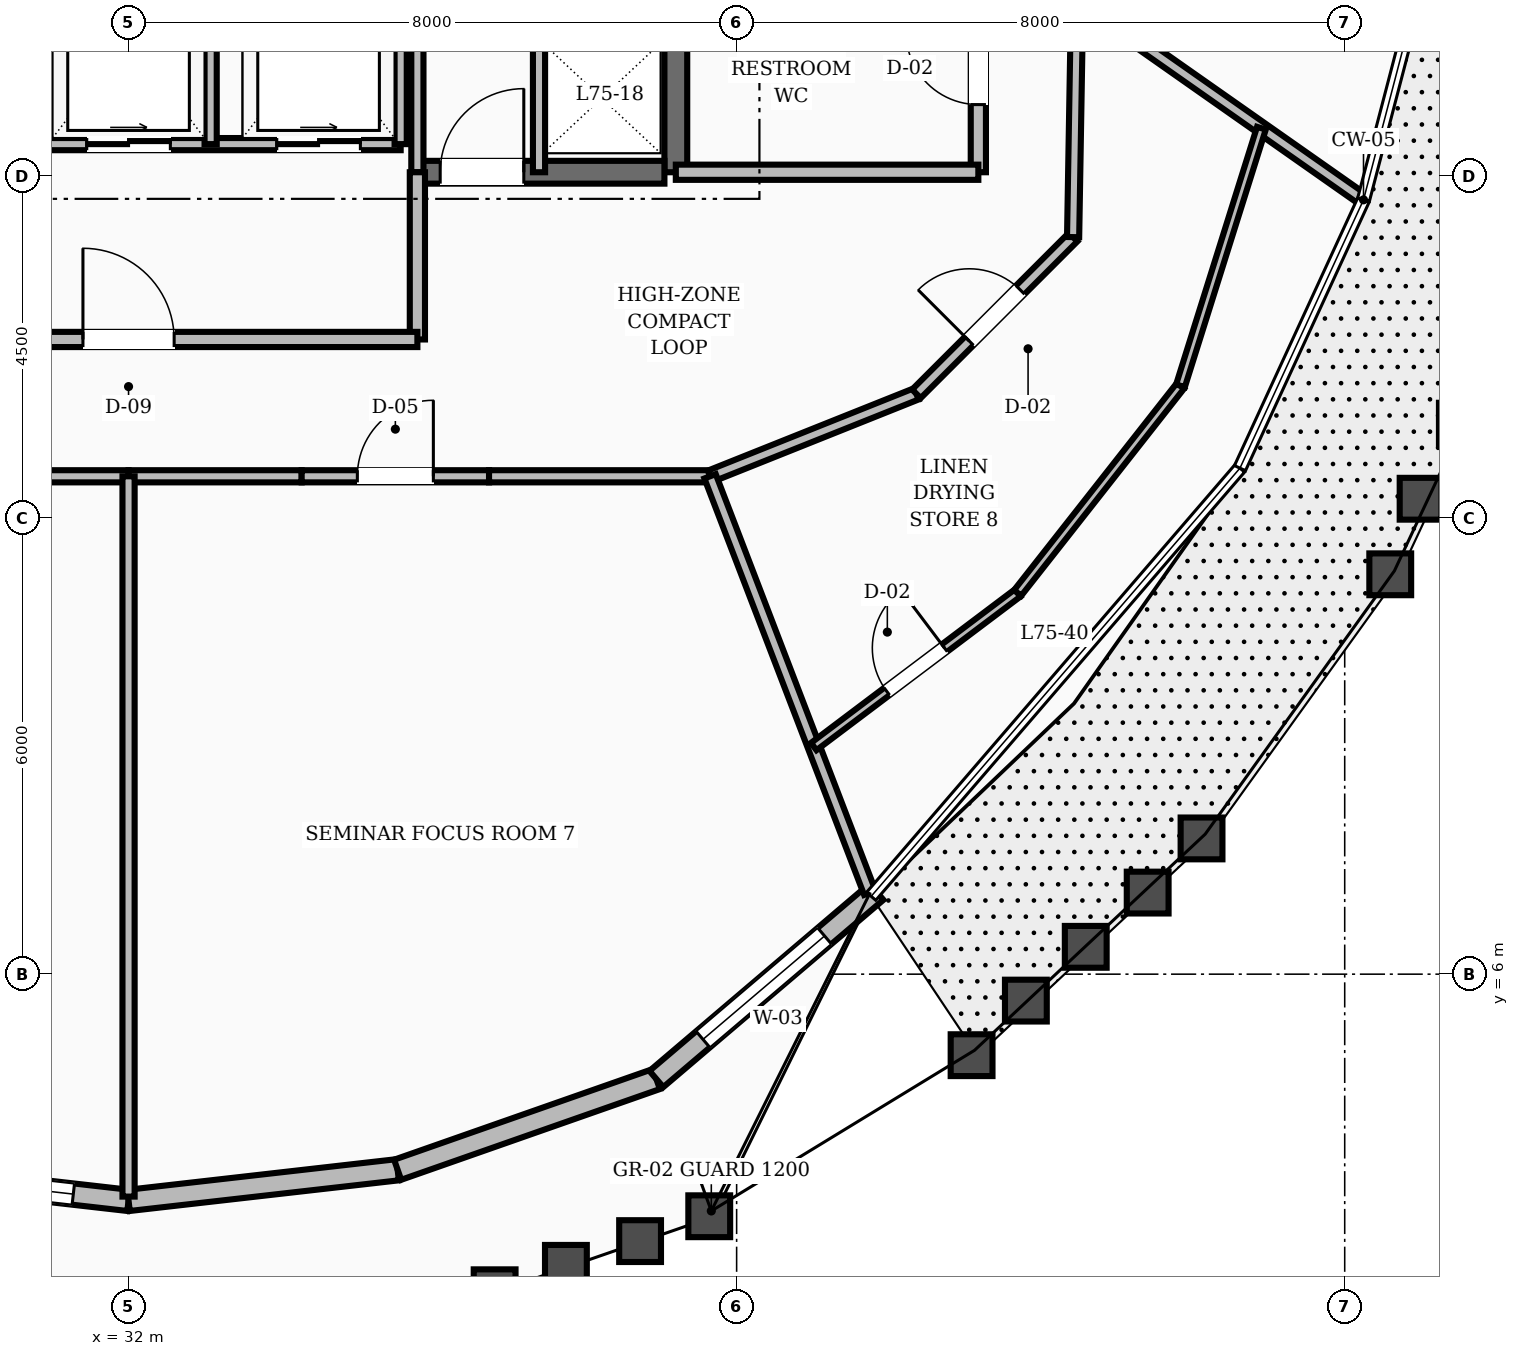
"""IFC4 building model, lengths in metres.
Left out: names, types, materials, properties, quantities, classifications, styles, units other than length and angle.
Written with IfcOpenShell. Run it as: python <this file> out.ifc"""

import sys

from ifc_helpers import new_model, si_unit, direction, frame, frame_2d, origin, place, context, subcontext, project, spatial, rectangle, extrude, element, fill, save


model = new_model("IFC4")
c1 = context("Model", 3, precision=1e-05, world=origin(), true_north=direction((0.0, 1.0)))
c2 = subcontext(c1, "Body", "Model", "MODEL_VIEW")
j1 = project(units=[si_unit("LENGTHUNIT", "METRE"), si_unit("PLANEANGLEUNIT", "RADIAN")], contexts=[c1])
p1 = place(None, origin())
s1 = spatial("IfcSite", under=j1, at=p1, CompositionType="ELEMENT")
p2 = place(p1, origin())
s2 = spatial("IfcBuilding", under=s1, at=p2, CompositionType="ELEMENT")
p3 = place(p2, frame((0.0, 0.0, 286.8)))
s3 = spatial("IfcBuildingStorey", under=s2, at=p3, CompositionType="ELEMENT", Elevation=286.8)
p4 = place(p3, frame((39.2, 16.55, 0.0), z_axis=(0.0, 0.0, 1.0), x_axis=(0.0, 1.0, 0.0)))
e1 = element("IfcWall", 1, at=p4, inside=s3, PredefinedType="SHEAR", context=c2, shape_type="SweptSolid", body=[
    extrude(rectangle(XDim=6.3, YDim=0.3, at=frame_2d((3.15, 0.0))), origin(), (0.0, 0.0, 1.0), 3.6),
])
p5 = place(p3, frame((35.8, 16.55, 0.0), z_axis=(0.0, 0.0, 1.0), x_axis=(1.0, 0.0, 0.0)))
e2 = element("IfcWall", 2, at=p5, inside=s3, PredefinedType="SHEAR", context=c2, shape_type="SweptSolid", body=[
    extrude(rectangle(XDim=3.25, YDim=0.3, at=frame_2d((1.625, 0.0))), origin(), (0.0, 0.0, 1.0), 3.6),
])
p6 = place(p5, frame((0.3, 0.0, 0.0)))
e3 = element("IfcOpeningElement", 3, at=p6, cuts=e2, PredefinedType="OPENING", context=c2, shape_type="SweptSolid", body=[
    extrude(rectangle(XDim=1.1, YDim=2.1, at=frame_2d((0.55, 1.05))), frame((0.0, 0.16, 0.0), z_axis=(0.0, -1.0, 0.0), x_axis=(1.0, 0.0, 0.0)), (0.0, 0.0, 1.0), 0.32),
])
p7 = place(p3, frame((28.46, 3.427, 0.0), z_axis=(0.0, 0.0, 1.0), x_axis=(0.993580071332, -0.113131082605, 0.0)))
e4 = element("IfcWall", 4, at=p7, inside=s3, PredefinedType="STANDARD", context=c2, shape_type="SweptSolid", body=[
    extrude(rectangle(XDim=3.563, YDim=0.28, at=frame_2d((1.781, 0.0))), origin(), (0.0, 0.0, 1.0), 2.88),
])
p8 = place(p7, frame((0.731, 0.0, 0.8)))
e5 = element("IfcOpeningElement", 5, at=p8, cuts=e4, PredefinedType="OPENING", context=c2, shape_type="SweptSolid", body=[
    extrude(rectangle(XDim=2.1, YDim=1.65, at=frame_2d((1.05, 0.825))), frame((0.0, 0.15, 0.0), z_axis=(0.0, -1.0, 0.0), x_axis=(1.0, 0.0, 0.0)), (0.0, 0.0, 1.0), 0.3),
])
p9 = place(p3, frame((32.0, 3.024, 0.0), z_axis=(0.0, 0.0, 1.0), x_axis=(0.993580071332, 0.113131082605, 0.0)))
e6 = element("IfcWall", 6, at=p9, inside=s3, PredefinedType="STANDARD", context=c2, shape_type="SweptSolid", body=[
    extrude(rectangle(XDim=3.563, YDim=0.28, at=frame_2d((1.781, 0.0))), origin(), (0.0, 0.0, 1.0), 2.88),
])
p10 = place(p3, frame((35.54, 3.427, 0.0), z_axis=(0.0, 0.0, 1.0), x_axis=(0.94366932977, 0.33089000597, 0.0)))
e7 = element("IfcWall", 7, at=p10, inside=s3, PredefinedType="STANDARD", context=c2, shape_type="SweptSolid", body=[
    extrude(rectangle(XDim=3.607, YDim=0.28, at=frame_2d((1.804, 0.0))), origin(), (0.0, 0.0, 1.0), 2.88),
])
p11 = place(p3, frame((38.944, 4.62, 0.0), z_axis=(0.0, 0.0, 1.0), x_axis=(0.7617032154, 0.64792608502, 0.0)))
e8 = element("IfcWall", 8, at=p11, inside=s3, PredefinedType="STANDARD", context=c2, shape_type="SweptSolid", body=[
    extrude(rectangle(XDim=3.802, YDim=0.28, at=frame_2d((1.901, 0.0))), origin(), (0.0, 0.0, 1.0), 2.88),
])
p12 = place(p11, frame((0.805, 0.0, 0.8)))
e9 = element("IfcOpeningElement", 9, at=p12, cuts=e8, PredefinedType="OPENING", context=c2, shape_type="SweptSolid", body=[
    extrude(rectangle(XDim=2.1, YDim=1.65, at=frame_2d((1.05, 0.825))), frame((0.0, 0.15, 0.0), z_axis=(0.0, -1.0, 0.0), x_axis=(1.0, 0.0, 0.0)), (0.0, 0.0, 1.0), 0.3),
])
p13 = place(p3, frame((43.18, 16.55, 0.0), z_axis=(0.0, 0.0, 1.0), x_axis=(0.0, 1.0, 0.0)))
e10 = element("IfcWall", 10, at=p13, inside=s3, PredefinedType="SOLIDWALL", context=c2, shape_type="SweptSolid", body=[
    extrude(rectangle(XDim=2.73, YDim=0.2, at=frame_2d((1.365, 0.0))), origin(), (0.0, 0.0, 1.0), 2.87),
])
p14 = place(p13, frame((0.89, 0.0, 0.0)))
e11 = element("IfcOpeningElement", 11, at=p14, cuts=e10, PredefinedType="OPENING", context=c2, shape_type="SweptSolid", body=[
    extrude(rectangle(XDim=0.95, YDim=2.1, at=frame_2d((0.475, 1.05))), frame((0.0, 0.11, 0.0), z_axis=(0.0, -1.0, 0.0), x_axis=(1.0, 0.0, 0.0)), (0.0, 0.0, 1.0), 0.22),
])
p15 = place(p3, frame((39.2, 16.55, 0.0), z_axis=(0.0, 0.0, 1.0), x_axis=(1.0, 0.0, 0.0)))
e12 = element("IfcWall", 12, at=p15, inside=s3, PredefinedType="SOLIDWALL", context=c2, shape_type="SweptSolid", body=[
    extrude(rectangle(XDim=3.98, YDim=0.2, at=frame_2d((1.99, 0.0))), origin(), (0.0, 0.0, 1.0), 2.87),
])
p16 = place(p3, frame((35.8, 16.55, 0.0), z_axis=(0.0, 0.0, 1.0), x_axis=(0.0, 1.0, 0.0)))
e13 = element("IfcWall", 13, at=p16, inside=s3, PredefinedType="SOLIDWALL", context=c2, shape_type="SweptSolid", body=[
    extrude(rectangle(XDim=3.3, YDim=0.16, at=frame_2d((1.65, 0.0))), origin(), (0.0, 0.0, 1.0), 2.87),
])
p17 = place(p3, frame((37.4, 16.55, 0.0), z_axis=(0.0, 0.0, 1.0), x_axis=(0.0, 1.0, 0.0)))
e14 = element("IfcWall", 14, at=p17, inside=s3, PredefinedType="SOLIDWALL", context=c2, shape_type="SweptSolid", body=[
    extrude(rectangle(XDim=1.75, YDim=0.16, at=frame_2d((0.875, 0.0))), origin(), (0.0, 0.0, 1.0), 2.87),
])
p18 = place(p3, frame((35.8, 14.35, 0.0), z_axis=(0.0, 0.0, 1.0), x_axis=(0.0, 1.0, 0.0)))
e15 = element("IfcWall", 15, at=p18, inside=s3, PredefinedType="SOLIDWALL", context=c2, shape_type="SweptSolid", body=[
    extrude(rectangle(XDim=2.2, YDim=0.2, at=frame_2d((1.1, 0.0))), origin(), (0.0, 0.0, 1.0), 2.87),
])
p19 = place(p3, frame((28.2, 14.35, 0.0), z_axis=(0.0, 0.0, 1.0), x_axis=(1.0, 0.0, 0.0)))
e16 = element("IfcWall", 16, at=p19, inside=s3, PredefinedType="SOLIDWALL", context=c2, shape_type="SweptSolid", body=[
    extrude(rectangle(XDim=7.6, YDim=0.2, at=frame_2d((3.8, 0.0))), origin(), (0.0, 0.0, 1.0), 2.87),
])
p20 = place(p19, frame((3.2, 0.0, 0.0)))
e17 = element("IfcOpeningElement", 17, at=p20, cuts=e16, PredefinedType="OPENING", context=c2, shape_type="SweptSolid", body=[
    extrude(rectangle(XDim=1.2, YDim=2.1, at=frame_2d((0.6, 1.05))), frame((0.0, 0.11, 0.0), z_axis=(0.0, -1.0, 0.0), x_axis=(1.0, 0.0, 0.0)), (0.0, 0.0, 1.0), 0.22),
])
p21 = place(p3, frame((28.42, 16.92, 0.0), z_axis=(0.0, 0.0, 1.0), x_axis=(1.0, 0.0, 0.0)))
e18 = element("IfcWall", 18, at=p21, inside=s3, PredefinedType="SOLIDWALL", context=c2, shape_type="SweptSolid", body=[
    extrude(rectangle(XDim=7.16, YDim=0.16, at=frame_2d((3.58, 0.0))), origin(), (0.0, 0.0, 1.0), 2.87),
])
p22 = place(p21, frame((0.53, 0.0, 0.0)))
e19 = element("IfcOpeningElement", 19, at=p22, cuts=e18, PredefinedType="OPENING", context=c2, shape_type="SweptSolid", body=[
    extrude(rectangle(XDim=1.1, YDim=2.15, at=frame_2d((0.55, 1.075))), frame((0.0, 0.09, 0.0), z_axis=(0.0, -1.0, 0.0), x_axis=(1.0, 0.0, 0.0)), (0.0, 0.0, 1.0), 0.18),
])
p23 = place(p21, frame((3.03, 0.0, 0.0)))
e20 = element("IfcOpeningElement", 20, at=p23, cuts=e18, PredefinedType="OPENING", context=c2, shape_type="SweptSolid", body=[
    extrude(rectangle(XDim=1.1, YDim=2.15, at=frame_2d((0.55, 1.075))), frame((0.0, 0.09, 0.0), z_axis=(0.0, -1.0, 0.0), x_axis=(1.0, 0.0, 0.0)), (0.0, 0.0, 1.0), 0.18),
])
p24 = place(p21, frame((5.53, 0.0, 0.0)))
e21 = element("IfcOpeningElement", 21, at=p24, cuts=e18, PredefinedType="OPENING", context=c2, shape_type="SweptSolid", body=[
    extrude(rectangle(XDim=1.1, YDim=2.15, at=frame_2d((0.55, 1.075))), frame((0.0, 0.09, 0.0), z_axis=(0.0, -1.0, 0.0), x_axis=(1.0, 0.0, 0.0)), (0.0, 0.0, 1.0), 0.18),
])
for number, where, z_axis, x_axis in (
    (22, (33.08, 16.92, 0.0), (0.0, 0.0, 1.0), (0.0, 1.0, 0.0)),
    (23, (35.58, 16.92, 0.0), (0.0, 0.0, 1.0), (0.0, 1.0, 0.0)),
):
    element("IfcWall", number, at=place(p3, frame(where, z_axis=z_axis, x_axis=x_axis)), inside=s3, PredefinedType="SOLIDWALL", context=c2, shape_type="SweptSolid", body=[
        extrude(rectangle(XDim=2.76, YDim=0.16, at=frame_2d((1.38, 0.0))), origin(), (0.0, 0.0, 1.0), 2.87),
    ])
for number, where, z_axis, x_axis in (
    (24, (29.722, 12.55, 0.0), (0.0, 0.0, 1.0), (1.0, 0.0, 0.0)),
    (25, (32.0, 12.55, 0.0), (0.0, 0.0, 1.0), (1.0, 0.0, 0.0)),
):
    element("IfcWall", number, at=place(p3, frame(where, z_axis=z_axis, x_axis=x_axis)), inside=s3, PredefinedType="SOLIDWALL", context=c2, shape_type="SweptSolid", body=[
        extrude(rectangle(XDim=2.278, YDim=0.16, at=frame_2d((1.139, 0.0))), origin(), (0.0, 0.0, 1.0), 2.87),
    ])
p25 = place(p3, frame((34.278, 12.55, 0.0), z_axis=(0.0, 0.0, 1.0), x_axis=(1.0, 0.0, 0.0)))
e26 = element("IfcWall", 26, at=p25, inside=s3, PredefinedType="SOLIDWALL", context=c2, shape_type="SweptSolid", body=[
    extrude(rectangle(XDim=2.465, YDim=0.16, at=frame_2d((1.232, 0.0))), origin(), (0.0, 0.0, 1.0), 2.87),
])
p26 = place(p25, frame((0.733, 0.0, 0.0)))
e27 = element("IfcOpeningElement", 27, at=p26, cuts=e26, PredefinedType="OPENING", context=c2, shape_type="SweptSolid", body=[
    extrude(rectangle(XDim=1.0, YDim=2.1, at=frame_2d((0.5, 1.05))), frame((0.0, 0.09, 0.0), z_axis=(0.0, -1.0, 0.0), x_axis=(1.0, 0.0, 0.0)), (0.0, 0.0, 1.0), 0.18),
])
p27 = place(p3, frame((36.743, 12.55, 0.0), z_axis=(0.0, 0.0, 1.0), x_axis=(1.0, 0.0, 0.0)))
e28 = element("IfcWall", 28, at=p27, inside=s3, PredefinedType="SOLIDWALL", context=c2, shape_type="SweptSolid", body=[
    extrude(rectangle(XDim=2.908, YDim=0.16, at=frame_2d((1.454, 0.0))), origin(), (0.0, 0.0, 1.0), 2.87),
])
p28 = place(p3, frame((39.651, 12.55, 0.0), z_axis=(0.0, 0.0, 1.0), x_axis=(0.92856882165, 0.371160266542, 0.0)))
e29 = element("IfcWall", 29, at=p28, inside=s3, PredefinedType="SOLIDWALL", context=c2, shape_type="SweptSolid", body=[
    extrude(rectangle(XDim=2.923, YDim=0.16, at=frame_2d((1.461, 0.0))), origin(), (0.0, 0.0, 1.0), 2.87),
])
p29 = place(p3, frame((42.365, 13.635, 0.0), z_axis=(0.0, 0.0, 1.0), x_axis=(0.707106781187, 0.707106781187, 0.0)))
e30 = element("IfcWall", 30, at=p29, inside=s3, PredefinedType="SOLIDWALL", context=c2, shape_type="SweptSolid", body=[
    extrude(rectangle(XDim=2.916, YDim=0.16, at=frame_2d((1.458, 0.0))), origin(), (0.0, 0.0, 1.0), 2.87),
])
p30 = place(p29, frame((0.983, 0.0, 0.0)))
e31 = element("IfcOpeningElement", 31, at=p30, cuts=e30, PredefinedType="OPENING", context=c2, shape_type="SweptSolid", body=[
    extrude(rectangle(XDim=0.95, YDim=2.1, at=frame_2d((0.475, 1.05))), frame((0.0, 0.09, 0.0), z_axis=(0.0, -1.0, 0.0), x_axis=(1.0, 0.0, 0.0)), (0.0, 0.0, 1.0), 0.18),
])
p31 = place(p3, frame((44.427, 15.697, 0.0), z_axis=(0.0, 0.0, 1.0), x_axis=(0.016981035134, 0.999855811828, 0.0)))
e32 = element("IfcWall", 32, at=p31, inside=s3, PredefinedType="SOLIDWALL", context=c2, shape_type="SweptSolid", body=[
    extrude(rectangle(XDim=3.134, YDim=0.16, at=frame_2d((1.567, 0.0))), origin(), (0.0, 0.0, 1.0), 2.87),
])
p32 = place(p3, frame((44.48, 18.831, 0.0), z_axis=(0.0, 0.0, 1.0), x_axis=(0.818578812532, -0.574394226706, 0.0)))
e33 = element("IfcWall", 33, at=p32, inside=s3, PredefinedType="SOLIDWALL", context=c2, shape_type="SweptSolid", body=[
    extrude(rectangle(XDim=4.552, YDim=0.16, at=frame_2d((2.276, 0.0))), origin(), (0.0, 0.0, 1.0), 2.87),
])
p33 = place(p3, frame((32.0, 12.55, 0.0), z_axis=(0.0, 0.0, 1.0), x_axis=(0.0, -1.0, 0.0)))
e34 = element("IfcWall", 34, at=p33, inside=s3, PredefinedType="SOLIDWALL", context=c2, shape_type="SweptSolid", body=[
    extrude(rectangle(XDim=9.477, YDim=0.16, at=frame_2d((4.738, 0.0))), origin(), (0.0, 0.0, 1.0), 2.87),
])
p34 = place(p3, frame((39.651, 12.55, 0.0), z_axis=(0.0, 0.0, 1.0), x_axis=(0.35812583623, -0.933673329074, 0.0)))
e35 = element("IfcWall", 35, at=p34, inside=s3, PredefinedType="SOLIDWALL", context=c2, shape_type="SweptSolid", body=[
    extrude(rectangle(XDim=5.868, YDim=0.16, at=frame_2d((2.934, 0.0))), origin(), (0.0, 0.0, 1.0), 2.87),
])
p35 = place(p3, frame((41.014, 8.994, 0.0), z_axis=(0.0, 0.0, 1.0), x_axis=(0.798742125261, 0.601673513904, 0.0)))
e36 = element("IfcWall", 36, at=p35, inside=s3, PredefinedType="PARTITIONING", context=c2, shape_type="SweptSolid", body=[
    extrude(rectangle(XDim=3.359, YDim=0.12, at=frame_2d((1.679, 0.0))), origin(), (0.0, 0.0, 1.0), 2.87),
])
p36 = place(p35, frame((1.204, 0.0, 0.0)))
e37 = element("IfcOpeningElement", 37, at=p36, cuts=e36, PredefinedType="OPENING", context=c2, shape_type="SweptSolid", body=[
    extrude(rectangle(XDim=0.95, YDim=2.1, at=frame_2d((0.475, 1.05))), frame((0.0, 0.07, 0.0), z_axis=(0.0, -1.0, 0.0), x_axis=(1.0, 0.0, 0.0)), (0.0, 0.0, 1.0), 0.14),
])
p37 = place(p3, frame((43.697, 11.015, 0.0), z_axis=(0.0, 0.0, 1.0), x_axis=(0.617930396217, 0.786232806127, 0.0)))
e38 = element("IfcWall", 38, at=p37, inside=s3, PredefinedType="PARTITIONING", context=c2, shape_type="SweptSolid", body=[
    extrude(rectangle(XDim=3.467, YDim=0.12, at=frame_2d((1.733, 0.0))), origin(), (0.0, 0.0, 1.0), 2.87),
])
p38 = place(p3, frame((45.839, 13.741, 0.0), z_axis=(0.0, 0.0, 1.0), x_axis=(0.299765824915, 0.954012814491, 0.0)))
e39 = element("IfcWall", 39, at=p38, inside=s3, PredefinedType="PARTITIONING", context=c2, shape_type="SweptSolid", body=[
    extrude(rectangle(XDim=3.552, YDim=0.12, at=frame_2d((1.776, 0.0))), origin(), (0.0, 0.0, 1.0), 2.87),
])
p39 = place(p8, origin())
e40 = element("IfcWindow", 40, at=p39, inside=s3, PartitioningType="SINGLE_PANEL", PredefinedType="WINDOW", context=c2, shape_type="SweptSolid", body=[
    extrude(rectangle(XDim=2.1, YDim=1.65, at=frame_2d((1.05, 0.825))), frame((0.0, 0.03, 0.0), z_axis=(0.0, -1.0, 0.0), x_axis=(1.0, 0.0, 0.0)), (0.0, 0.0, 1.0), 0.06),
])
fill(e5, e40)
p40 = place(p12, origin())
e41 = element("IfcWindow", 41, at=p40, inside=s3, PartitioningType="SINGLE_PANEL", PredefinedType="WINDOW", context=c2, shape_type="SweptSolid", body=[
    extrude(rectangle(XDim=2.1, YDim=1.65, at=frame_2d((1.05, 0.825))), frame((0.0, 0.03, 0.0), z_axis=(0.0, -1.0, 0.0), x_axis=(1.0, 0.0, 0.0)), (0.0, 0.0, 1.0), 0.06),
])
fill(e9, e41)
p41 = place(p14, origin())
e42 = element("IfcDoor", 42, at=p41, inside=s3, OperationType="SINGLE_SWING_RIGHT", PredefinedType="DOOR", context=c2, shape_type="SweptSolid", body=[
    extrude(rectangle(XDim=0.95, YDim=2.1, at=frame_2d((0.475, 1.05))), frame((0.0, 0.025, 0.0), z_axis=(0.0, -1.0, 0.0), x_axis=(1.0, 0.0, 0.0)), (0.0, 0.0, 1.0), 0.05),
])
fill(e11, e42)
p42 = place(p6, origin())
e43 = element("IfcDoor", 43, at=p42, inside=s3, OperationType="SINGLE_SWING_RIGHT", PredefinedType="DOOR", context=c2, shape_type="SweptSolid", body=[
    extrude(rectangle(XDim=1.1, YDim=2.1, at=frame_2d((0.55, 1.05))), frame((0.0, 0.025, 0.0), z_axis=(0.0, -1.0, 0.0), x_axis=(1.0, 0.0, 0.0)), (0.0, 0.0, 1.0), 0.05),
])
fill(e3, e43)
p43 = place(p20, origin())
e44 = element("IfcDoor", 44, at=p43, inside=s3, OperationType="SINGLE_SWING_LEFT", PredefinedType="DOOR", context=c2, shape_type="SweptSolid", body=[
    extrude(rectangle(XDim=1.2, YDim=2.1, at=frame_2d((0.6, 1.05))), frame((0.0, 0.025, 0.0), z_axis=(0.0, -1.0, 0.0), x_axis=(1.0, 0.0, 0.0)), (0.0, 0.0, 1.0), 0.05),
])
fill(e17, e44)
p44 = place(p23, origin())
e45 = element("IfcDoor", 45, at=p44, inside=s3, OperationType="SLIDING_TO_RIGHT", PredefinedType="DOOR", context=c2, shape_type="SweptSolid", body=[
    extrude(rectangle(XDim=1.1, YDim=2.15, at=frame_2d((0.55, 1.075))), frame((0.0, 0.025, 0.0), z_axis=(0.0, -1.0, 0.0), x_axis=(1.0, 0.0, 0.0)), (0.0, 0.0, 1.0), 0.05),
])
fill(e20, e45)
p45 = place(p24, origin())
e46 = element("IfcDoor", 46, at=p45, inside=s3, OperationType="SLIDING_TO_RIGHT", PredefinedType="DOOR", context=c2, shape_type="SweptSolid", body=[
    extrude(rectangle(XDim=1.1, YDim=2.15, at=frame_2d((0.55, 1.075))), frame((0.0, 0.025, 0.0), z_axis=(0.0, -1.0, 0.0), x_axis=(1.0, 0.0, 0.0)), (0.0, 0.0, 1.0), 0.05),
])
fill(e21, e46)
p46 = place(p26, origin())
e47 = element("IfcDoor", 47, at=p46, inside=s3, OperationType="SINGLE_SWING_RIGHT", PredefinedType="DOOR", context=c2, shape_type="SweptSolid", body=[
    extrude(rectangle(XDim=1.0, YDim=2.1, at=frame_2d((0.5, 1.05))), frame((0.0, 0.025, 0.0), z_axis=(0.0, -1.0, 0.0), x_axis=(1.0, 0.0, 0.0)), (0.0, 0.0, 1.0), 0.05),
])
fill(e27, e47)
p47 = place(p30, origin())
e48 = element("IfcDoor", 48, at=p47, inside=s3, OperationType="SINGLE_SWING_LEFT", PredefinedType="DOOR", context=c2, shape_type="SweptSolid", body=[
    extrude(rectangle(XDim=0.95, YDim=2.1, at=frame_2d((0.475, 1.05))), frame((0.0, 0.025, 0.0), z_axis=(0.0, -1.0, 0.0), x_axis=(1.0, 0.0, 0.0)), (0.0, 0.0, 1.0), 0.05),
])
fill(e31, e48)
p48 = place(p36, origin())
e49 = element("IfcDoor", 49, at=p48, inside=s3, OperationType="SINGLE_SWING_RIGHT", PredefinedType="DOOR", context=c2, shape_type="SweptSolid", body=[
    extrude(rectangle(XDim=0.95, YDim=2.1, at=frame_2d((0.475, 1.05))), frame((0.0, 0.025, 0.0), z_axis=(0.0, -1.0, 0.0), x_axis=(1.0, 0.0, 0.0)), (0.0, 0.0, 1.0), 0.05),
])
fill(e37, e49)
save(model, sys.argv[1])
